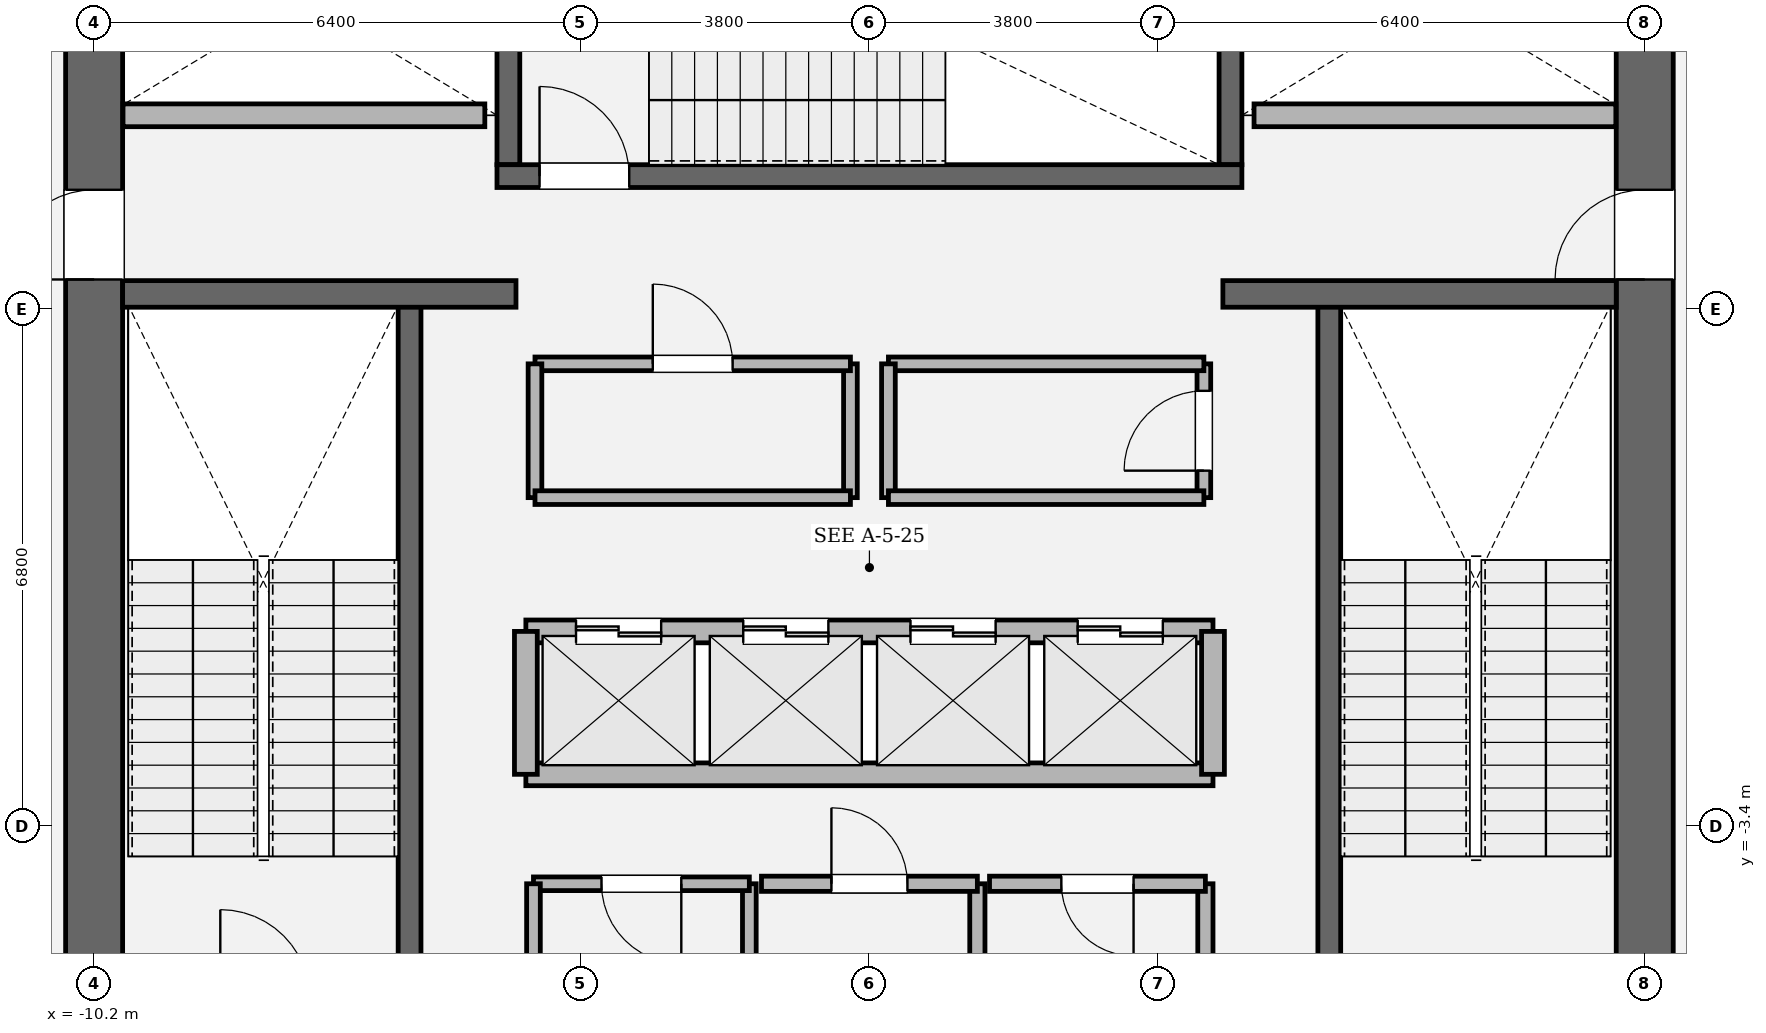
"""IFC4 building model, lengths in metres.
Left out: names, types, materials, properties, quantities, classifications, styles, units other than length and angle.
Written with IfcOpenShell. Run it as: python <this file> out.ifc"""

import sys

from ifc_helpers import new_model, si_unit, direction, frame, frame_2d, origin, place, context, subcontext, project, spatial, rectangle, extrude, element, fill, save


model = new_model("IFC4")
c1 = context("Model", 3, precision=1e-05, world=origin(), true_north=direction((0.0, 1.0)))
c2 = subcontext(c1, "Body", "Model", "MODEL_VIEW")
j1 = project(units=[si_unit("LENGTHUNIT", "METRE"), si_unit("PLANEANGLEUNIT", "RADIAN")], contexts=[c1])
p1 = place(None, origin())
s1 = spatial("IfcSite", under=j1, at=p1, CompositionType="ELEMENT")
p2 = place(p1, origin())
s2 = spatial("IfcBuilding", under=s1, at=p2, CompositionType="ELEMENT")
p3 = place(p2, frame((0.0, 0.0, 121.35)))
s3 = spatial("IfcBuildingStorey", under=s2, at=p3, CompositionType="ELEMENT", Elevation=121.35)
p4 = place(p3, frame((-10.2, -8.825, 0.0), z_axis=(0.0, 0.0, 1.0), x_axis=(0.0, 1.0, 0.0)))
e1 = element("IfcWall", 1, at=p4, inside=s3, PredefinedType="SHEAR", context=c2, shape_type="SweptSolid", body=[
    extrude(rectangle(XDim=17.65, YDim=0.75, at=frame_2d((8.825, 0.0))), origin(), (0.0, 0.0, 1.0), 4.05),
])
p5 = place(p4, frame((12.615, 0.0, 0.0)))
e2 = element("IfcOpeningElement", 2, at=p5, cuts=e1, PredefinedType="OPENING", context=c2, shape_type="SweptSolid", body=[
    extrude(rectangle(XDim=1.18, YDim=2.2, at=frame_2d((0.59, 1.1))), frame((0.0, 0.385, 0.0), z_axis=(0.0, -1.0, 0.0), x_axis=(1.0, 0.0, 0.0)), (0.0, 0.0, 1.0), 0.77),
])
p6 = place(p3, frame((10.2, 8.825, 0.0), z_axis=(0.0, 0.0, 1.0), x_axis=(0.0, -1.0, 0.0)))
e3 = element("IfcWall", 3, at=p6, inside=s3, PredefinedType="SHEAR", context=c2, shape_type="SweptSolid", body=[
    extrude(rectangle(XDim=17.65, YDim=0.75, at=frame_2d((8.825, 0.0))), origin(), (0.0, 0.0, 1.0), 4.05),
])
p7 = place(p6, frame((3.855, 0.0, 0.0)))
e4 = element("IfcOpeningElement", 4, at=p7, cuts=e3, PredefinedType="OPENING", context=c2, shape_type="SweptSolid", body=[
    extrude(rectangle(XDim=1.18, YDim=2.2, at=frame_2d((0.59, 1.1))), frame((0.0, 0.385, 0.0), z_axis=(0.0, -1.0, 0.0), x_axis=(1.0, 0.0, 0.0)), (0.0, 0.0, 1.0), 0.77),
])
for number, where, z_axis, x_axis in (
    (5, (-6.05, -5.5, 0.0), (0.0, 0.0, 1.0), (0.0, 1.0, 0.0)),
    (6, (6.05, 3.45, 0.0), (0.0, 0.0, 1.0), (0.0, -1.0, 0.0)),
):
    element("IfcWall", number, at=place(p3, frame(where, z_axis=z_axis, x_axis=x_axis)), inside=s3, PredefinedType="SOLIDWALL", context=c2, shape_type="SweptSolid", body=[
        extrude(rectangle(XDim=8.95, YDim=0.3, at=frame_2d((4.475, 0.0))), origin(), (0.0, 0.0, 1.0), 4.05),
    ])
for number, where, z_axis, x_axis in (
    (7, (-4.75, 5.3, 0.0), (0.0, 0.0, 1.0), (0.0, 1.0, 0.0)),
    (8, (4.75, 8.825, 0.0), (0.0, 0.0, 1.0), (0.0, -1.0, 0.0)),
):
    element("IfcWall", number, at=place(p3, frame(where, z_axis=z_axis, x_axis=x_axis)), inside=s3, PredefinedType="SOLIDWALL", context=c2, shape_type="SweptSolid", body=[
        extrude(rectangle(XDim=3.525, YDim=0.3, at=frame_2d((1.762, 0.0))), origin(), (0.0, 0.0, 1.0), 4.05),
    ])
p8 = place(p3, frame((-4.9, 5.15, 0.0), z_axis=(0.0, 0.0, 1.0), x_axis=(1.0, 0.0, 0.0)))
e9 = element("IfcWall", 9, at=p8, inside=s3, PredefinedType="SOLIDWALL", context=c2, shape_type="SweptSolid", body=[
    extrude(rectangle(XDim=9.8, YDim=0.3, at=frame_2d((4.9, 0.0))), origin(), (0.0, 0.0, 1.0), 4.05),
])
p9 = place(p8, frame((0.56, 0.0, 0.0)))
e10 = element("IfcOpeningElement", 10, at=p9, cuts=e9, PredefinedType="OPENING", context=c2, shape_type="SweptSolid", body=[
    extrude(rectangle(XDim=1.18, YDim=2.2, at=frame_2d((0.59, 1.1))), frame((0.0, 0.16, 0.0), z_axis=(0.0, -1.0, 0.0), x_axis=(1.0, 0.0, 0.0)), (0.0, 0.0, 1.0), 0.32),
])
for number, where, z_axis, x_axis in (
    (11, (-9.825, 3.6, 0.0), (0.0, 0.0, 1.0), (1.0, 0.0, 0.0)),
    (12, (4.65, 3.6, 0.0), (0.0, 0.0, 1.0), (1.0, 0.0, 0.0)),
):
    element("IfcWall", number, at=place(p3, frame(where, z_axis=z_axis, x_axis=x_axis)), inside=s3, PredefinedType="SOLIDWALL", context=c2, shape_type="SweptSolid", body=[
        extrude(rectangle(XDim=5.175, YDim=0.35, at=frame_2d((2.587, 0.0))), origin(), (0.0, 0.0, 1.0), 4.05),
    ])
p10 = place(p3, frame((-4.52, -0.84, 0.0), z_axis=(0.0, 0.0, 1.0), x_axis=(1.0, 0.0, 0.0)))
e13 = element("IfcWall", 13, at=p10, inside=s3, PredefinedType="SOLIDWALL", context=c2, shape_type="SweptSolid", body=[
    extrude(rectangle(XDim=9.04, YDim=0.3, at=frame_2d((4.52, 0.0))), origin(), (0.0, 0.0, 1.0), 3.73),
])
p11 = place(p10, frame((0.66, 0.0, 0.0)))
e14 = element("IfcOpeningElement", 14, at=p11, cuts=e13, PredefinedType="OPENING", context=c2, shape_type="SweptSolid", body=[
    extrude(rectangle(XDim=1.12, YDim=2.25, at=frame_2d((0.56, 1.125))), frame((0.0, 0.16, 0.0), z_axis=(0.0, -1.0, 0.0), x_axis=(1.0, 0.0, 0.0)), (0.0, 0.0, 1.0), 0.32),
])
p12 = place(p10, frame((2.86, 0.0, 0.0)))
e15 = element("IfcOpeningElement", 15, at=p12, cuts=e13, PredefinedType="OPENING", context=c2, shape_type="SweptSolid", body=[
    extrude(rectangle(XDim=1.12, YDim=2.25, at=frame_2d((0.56, 1.125))), frame((0.0, 0.16, 0.0), z_axis=(0.0, -1.0, 0.0), x_axis=(1.0, 0.0, 0.0)), (0.0, 0.0, 1.0), 0.32),
])
p13 = place(p10, frame((5.06, 0.0, 0.0)))
e16 = element("IfcOpeningElement", 16, at=p13, cuts=e13, PredefinedType="OPENING", context=c2, shape_type="SweptSolid", body=[
    extrude(rectangle(XDim=1.12, YDim=2.25, at=frame_2d((0.56, 1.125))), frame((0.0, 0.16, 0.0), z_axis=(0.0, -1.0, 0.0), x_axis=(1.0, 0.0, 0.0)), (0.0, 0.0, 1.0), 0.32),
])
p14 = place(p10, frame((7.26, 0.0, 0.0)))
e17 = element("IfcOpeningElement", 17, at=p14, cuts=e13, PredefinedType="OPENING", context=c2, shape_type="SweptSolid", body=[
    extrude(rectangle(XDim=1.12, YDim=2.25, at=frame_2d((0.56, 1.125))), frame((0.0, 0.16, 0.0), z_axis=(0.0, -1.0, 0.0), x_axis=(1.0, 0.0, 0.0)), (0.0, 0.0, 1.0), 0.32),
])
p15 = place(p3, frame((-4.52, -2.72, 0.0), z_axis=(0.0, 0.0, 1.0), x_axis=(1.0, 0.0, 0.0)))
e18 = element("IfcWall", 18, at=p15, inside=s3, PredefinedType="SOLIDWALL", context=c2, shape_type="SweptSolid", body=[
    extrude(rectangle(XDim=9.04, YDim=0.3, at=frame_2d((4.52, 0.0))), origin(), (0.0, 0.0, 1.0), 3.73),
])
for number, where, z_axis, x_axis in (
    (19, (-4.52, -2.72, 0.0), (0.0, 0.0, 1.0), (0.0, 1.0, 0.0)),
    (20, (4.52, -2.72, 0.0), (0.0, 0.0, 1.0), (0.0, 1.0, 0.0)),
):
    element("IfcWall", number, at=place(p3, frame(where, z_axis=z_axis, x_axis=x_axis)), inside=s3, PredefinedType="SOLIDWALL", context=c2, shape_type="SweptSolid", body=[
        extrude(rectangle(XDim=1.88, YDim=0.3, at=frame_2d((0.94, 0.0))), origin(), (0.0, 0.0, 1.0), 3.73),
    ])
for number, where, z_axis, x_axis in (
    (21, (-9.82, 5.95, 0.0), (0.0, 0.0, 1.0), (1.0, 0.0, 0.0)),
    (22, (5.06, 5.95, 0.0), (0.0, 0.0, 1.0), (1.0, 0.0, 0.0)),
):
    element("IfcWall", number, at=place(p3, frame(where, z_axis=z_axis, x_axis=x_axis)), inside=s3, PredefinedType="SOLIDWALL", context=c2, shape_type="SweptSolid", body=[
        extrude(rectangle(XDim=4.76, YDim=0.3, at=frame_2d((2.38, 0.0))), origin(), (0.0, 0.0, 1.0), 3.73),
    ])
p16 = place(p3, frame((-1.58, -5.9, 0.0), z_axis=(0.0, 0.0, 1.0), x_axis=(0.0, 1.0, 0.0)))
e23 = element("IfcWall", 23, at=p16, inside=s3, PredefinedType="PARTITIONING", context=c2, shape_type="SweptSolid", body=[
    extrude(rectangle(XDim=1.74, YDim=0.18, at=frame_2d((0.87, 0.0))), origin(), (0.0, 0.0, 1.0), 3.73),
])
p17 = place(p3, frame((-1.58, -4.16, 0.0), z_axis=(0.0, 0.0, 1.0), x_axis=(-1.0, 0.0, 0.0)))
e24 = element("IfcWall", 24, at=p17, inside=s3, PredefinedType="PARTITIONING", context=c2, shape_type="SweptSolid", body=[
    extrude(rectangle(XDim=2.84, YDim=0.18, at=frame_2d((1.42, 0.0))), origin(), (0.0, 0.0, 1.0), 3.73),
])
p18 = place(p17, frame((0.895, 0.0, 0.0)))
e25 = element("IfcOpeningElement", 25, at=p18, cuts=e24, PredefinedType="OPENING", context=c2, shape_type="SweptSolid", body=[
    extrude(rectangle(XDim=1.05, YDim=2.2, at=frame_2d((0.525, 1.1))), frame((0.0, 0.1, 0.0), z_axis=(0.0, -1.0, 0.0), x_axis=(1.0, 0.0, 0.0)), (0.0, 0.0, 1.0), 0.2),
])
p19 = place(p3, frame((-4.42, -4.16, 0.0), z_axis=(0.0, 0.0, 1.0), x_axis=(0.0, -1.0, 0.0)))
e26 = element("IfcWall", 26, at=p19, inside=s3, PredefinedType="PARTITIONING", context=c2, shape_type="SweptSolid", body=[
    extrude(rectangle(XDim=1.74, YDim=0.18, at=frame_2d((0.87, 0.0))), origin(), (0.0, 0.0, 1.0), 3.73),
])
p20 = place(p3, frame((1.42, -5.9, 0.0), z_axis=(0.0, 0.0, 1.0), x_axis=(0.0, 1.0, 0.0)))
e27 = element("IfcWall", 27, at=p20, inside=s3, PredefinedType="SOLIDWALL", context=c2, shape_type="SweptSolid", body=[
    extrude(rectangle(XDim=1.74, YDim=0.2, at=frame_2d((0.87, 0.0))), origin(), (0.0, 0.0, 1.0), 3.73),
])
p21 = place(p3, frame((1.42, -4.16, 0.0), z_axis=(0.0, 0.0, 1.0), x_axis=(-1.0, 0.0, 0.0)))
e28 = element("IfcWall", 28, at=p21, inside=s3, PredefinedType="SOLIDWALL", context=c2, shape_type="SweptSolid", body=[
    extrude(rectangle(XDim=2.84, YDim=0.2, at=frame_2d((1.42, 0.0))), origin(), (0.0, 0.0, 1.0), 3.73),
])
p22 = place(p21, frame((0.92, 0.0, 0.0)))
e29 = element("IfcOpeningElement", 29, at=p22, cuts=e28, PredefinedType="OPENING", context=c2, shape_type="SweptSolid", body=[
    extrude(rectangle(XDim=1.0, YDim=2.15, at=frame_2d((0.5, 1.075))), frame((0.0, 0.11, 0.0), z_axis=(0.0, -1.0, 0.0), x_axis=(1.0, 0.0, 0.0)), (0.0, 0.0, 1.0), 0.22),
])
p23 = place(p3, frame((4.42, -5.9, 0.0), z_axis=(0.0, 0.0, 1.0), x_axis=(0.0, 1.0, 0.0)))
e30 = element("IfcWall", 30, at=p23, inside=s3, PredefinedType="SOLIDWALL", context=c2, shape_type="SweptSolid", body=[
    extrude(rectangle(XDim=1.74, YDim=0.2, at=frame_2d((0.87, 0.0))), origin(), (0.0, 0.0, 1.0), 3.73),
])
p24 = place(p3, frame((4.42, -4.16, 0.0), z_axis=(0.0, 0.0, 1.0), x_axis=(-1.0, 0.0, 0.0)))
e31 = element("IfcWall", 31, at=p24, inside=s3, PredefinedType="SOLIDWALL", context=c2, shape_type="SweptSolid", body=[
    extrude(rectangle(XDim=2.84, YDim=0.2, at=frame_2d((1.42, 0.0))), origin(), (0.0, 0.0, 1.0), 3.73),
])
p25 = place(p24, frame((0.945, 0.0, 0.0)))
e32 = element("IfcOpeningElement", 32, at=p25, cuts=e31, PredefinedType="OPENING", context=c2, shape_type="SweptSolid", body=[
    extrude(rectangle(XDim=0.95, YDim=2.15, at=frame_2d((0.475, 1.075))), frame((0.0, 0.11, 0.0), z_axis=(0.0, -1.0, 0.0), x_axis=(1.0, 0.0, 0.0)), (0.0, 0.0, 1.0), 0.22),
])
p26 = place(p3, frame((-0.25, 0.92, 0.0), z_axis=(0.0, 0.0, 1.0), x_axis=(0.0, 1.0, 0.0)))
e33 = element("IfcWall", 33, at=p26, inside=s3, PredefinedType="PARTITIONING", context=c2, shape_type="SweptSolid", body=[
    extrude(rectangle(XDim=1.76, YDim=0.18, at=frame_2d((0.88, 0.0))), origin(), (0.0, 0.0, 1.0), 3.73),
])
p27 = place(p3, frame((-0.25, 2.68, 0.0), z_axis=(0.0, 0.0, 1.0), x_axis=(-1.0, 0.0, 0.0)))
e34 = element("IfcWall", 34, at=p27, inside=s3, PredefinedType="PARTITIONING", context=c2, shape_type="SweptSolid", body=[
    extrude(rectangle(XDim=4.15, YDim=0.18, at=frame_2d((2.075, 0.0))), origin(), (0.0, 0.0, 1.0), 3.73),
])
p28 = place(p27, frame((1.55, 0.0, 0.0)))
e35 = element("IfcOpeningElement", 35, at=p28, cuts=e34, PredefinedType="OPENING", context=c2, shape_type="SweptSolid", body=[
    extrude(rectangle(XDim=1.05, YDim=2.2, at=frame_2d((0.525, 1.1))), frame((0.0, 0.1, 0.0), z_axis=(0.0, -1.0, 0.0), x_axis=(1.0, 0.0, 0.0)), (0.0, 0.0, 1.0), 0.2),
])
p29 = place(p3, frame((-4.4, 2.68, 0.0), z_axis=(0.0, 0.0, 1.0), x_axis=(0.0, -1.0, 0.0)))
e36 = element("IfcWall", 36, at=p29, inside=s3, PredefinedType="PARTITIONING", context=c2, shape_type="SweptSolid", body=[
    extrude(rectangle(XDim=1.76, YDim=0.18, at=frame_2d((0.88, 0.0))), origin(), (0.0, 0.0, 1.0), 3.73),
])
p30 = place(p3, frame((-4.4, 0.92, 0.0), z_axis=(0.0, 0.0, 1.0), x_axis=(1.0, 0.0, 0.0)))
e37 = element("IfcWall", 37, at=p30, inside=s3, PredefinedType="PARTITIONING", context=c2, shape_type="SweptSolid", body=[
    extrude(rectangle(XDim=4.15, YDim=0.18, at=frame_2d((2.075, 0.0))), origin(), (0.0, 0.0, 1.0), 3.73),
])
p31 = place(p3, frame((4.4, 0.92, 0.0), z_axis=(0.0, 0.0, 1.0), x_axis=(0.0, 1.0, 0.0)))
e38 = element("IfcWall", 38, at=p31, inside=s3, PredefinedType="PARTITIONING", context=c2, shape_type="SweptSolid", body=[
    extrude(rectangle(XDim=1.76, YDim=0.18, at=frame_2d((0.88, 0.0))), origin(), (0.0, 0.0, 1.0), 3.73),
])
p32 = place(p31, frame((0.355, 0.0, 0.0)))
e39 = element("IfcOpeningElement", 39, at=p32, cuts=e38, PredefinedType="OPENING", context=c2, shape_type="SweptSolid", body=[
    extrude(rectangle(XDim=1.05, YDim=2.2, at=frame_2d((0.525, 1.1))), frame((0.0, 0.1, 0.0), z_axis=(0.0, -1.0, 0.0), x_axis=(1.0, 0.0, 0.0)), (0.0, 0.0, 1.0), 0.2),
])
p33 = place(p3, frame((4.4, 2.68, 0.0), z_axis=(0.0, 0.0, 1.0), x_axis=(-1.0, 0.0, 0.0)))
e40 = element("IfcWall", 40, at=p33, inside=s3, PredefinedType="PARTITIONING", context=c2, shape_type="SweptSolid", body=[
    extrude(rectangle(XDim=4.15, YDim=0.18, at=frame_2d((2.075, 0.0))), origin(), (0.0, 0.0, 1.0), 3.73),
])
p34 = place(p3, frame((0.25, 2.68, 0.0), z_axis=(0.0, 0.0, 1.0), x_axis=(0.0, -1.0, 0.0)))
e41 = element("IfcWall", 41, at=p34, inside=s3, PredefinedType="PARTITIONING", context=c2, shape_type="SweptSolid", body=[
    extrude(rectangle(XDim=1.76, YDim=0.18, at=frame_2d((0.88, 0.0))), origin(), (0.0, 0.0, 1.0), 3.73),
])
p35 = place(p3, frame((0.25, 0.92, 0.0), z_axis=(0.0, 0.0, 1.0), x_axis=(1.0, 0.0, 0.0)))
e42 = element("IfcWall", 42, at=p35, inside=s3, PredefinedType="PARTITIONING", context=c2, shape_type="SweptSolid", body=[
    extrude(rectangle(XDim=4.15, YDim=0.18, at=frame_2d((2.075, 0.0))), origin(), (0.0, 0.0, 1.0), 3.73),
])
p36 = place(p9, origin())
e43 = element("IfcDoor", 43, at=p36, inside=s3, OperationType="SINGLE_SWING_LEFT", PredefinedType="DOOR", context=c2, shape_type="SweptSolid", body=[
    extrude(rectangle(XDim=1.18, YDim=2.2, at=frame_2d((0.59, 1.1))), frame((0.0, 0.025, 0.0), z_axis=(0.0, -1.0, 0.0), x_axis=(1.0, 0.0, 0.0)), (0.0, 0.0, 1.0), 0.05),
])
fill(e10, e43)
p37 = place(p5, origin())
e44 = element("IfcDoor", 44, at=p37, inside=s3, OperationType="SINGLE_SWING_LEFT", PredefinedType="DOOR", context=c2, shape_type="SweptSolid", body=[
    extrude(rectangle(XDim=1.18, YDim=2.2, at=frame_2d((0.59, 1.1))), frame((0.0, 0.025, 0.0), z_axis=(0.0, -1.0, 0.0), x_axis=(1.0, 0.0, 0.0)), (0.0, 0.0, 1.0), 0.05),
])
fill(e2, e44)
p38 = place(p7, origin())
e45 = element("IfcDoor", 45, at=p38, inside=s3, OperationType="SINGLE_SWING_RIGHT", PredefinedType="DOOR", context=c2, shape_type="SweptSolid", body=[
    extrude(rectangle(XDim=1.18, YDim=2.2, at=frame_2d((0.59, 1.1))), frame((0.0, 0.025, 0.0), z_axis=(0.0, -1.0, 0.0), x_axis=(1.0, 0.0, 0.0)), (0.0, 0.0, 1.0), 0.05),
])
fill(e4, e45)
p39 = place(p11, origin())
e46 = element("IfcDoor", 46, at=p39, inside=s3, OperationType="DOUBLE_DOOR_SLIDING", PredefinedType="DOOR", context=c2, shape_type="SweptSolid", body=[
    extrude(rectangle(XDim=1.12, YDim=2.25, at=frame_2d((0.56, 1.125))), frame((0.0, 0.025, 0.0), z_axis=(0.0, -1.0, 0.0), x_axis=(1.0, 0.0, 0.0)), (0.0, 0.0, 1.0), 0.05),
])
fill(e14, e46)
p40 = place(p12, origin())
e47 = element("IfcDoor", 47, at=p40, inside=s3, OperationType="DOUBLE_DOOR_SLIDING", PredefinedType="DOOR", context=c2, shape_type="SweptSolid", body=[
    extrude(rectangle(XDim=1.12, YDim=2.25, at=frame_2d((0.56, 1.125))), frame((0.0, 0.025, 0.0), z_axis=(0.0, -1.0, 0.0), x_axis=(1.0, 0.0, 0.0)), (0.0, 0.0, 1.0), 0.05),
])
fill(e15, e47)
p41 = place(p13, origin())
e48 = element("IfcDoor", 48, at=p41, inside=s3, OperationType="DOUBLE_DOOR_SLIDING", PredefinedType="DOOR", context=c2, shape_type="SweptSolid", body=[
    extrude(rectangle(XDim=1.12, YDim=2.25, at=frame_2d((0.56, 1.125))), frame((0.0, 0.025, 0.0), z_axis=(0.0, -1.0, 0.0), x_axis=(1.0, 0.0, 0.0)), (0.0, 0.0, 1.0), 0.05),
])
fill(e16, e48)
p42 = place(p14, origin())
e49 = element("IfcDoor", 49, at=p42, inside=s3, OperationType="DOUBLE_DOOR_SLIDING", PredefinedType="DOOR", context=c2, shape_type="SweptSolid", body=[
    extrude(rectangle(XDim=1.12, YDim=2.25, at=frame_2d((0.56, 1.125))), frame((0.0, 0.025, 0.0), z_axis=(0.0, -1.0, 0.0), x_axis=(1.0, 0.0, 0.0)), (0.0, 0.0, 1.0), 0.05),
])
fill(e17, e49)
p43 = place(p18, origin())
e50 = element("IfcDoor", 50, at=p43, inside=s3, OperationType="SINGLE_SWING_LEFT", PredefinedType="DOOR", context=c2, shape_type="SweptSolid", body=[
    extrude(rectangle(XDim=1.05, YDim=2.2, at=frame_2d((0.525, 1.1))), frame((0.0, 0.025, 0.0), z_axis=(0.0, -1.0, 0.0), x_axis=(1.0, 0.0, 0.0)), (0.0, 0.0, 1.0), 0.05),
])
fill(e25, e50)
p44 = place(p22, origin())
e51 = element("IfcDoor", 51, at=p44, inside=s3, OperationType="SINGLE_SWING_RIGHT", PredefinedType="DOOR", context=c2, shape_type="SweptSolid", body=[
    extrude(rectangle(XDim=1.0, YDim=2.15, at=frame_2d((0.5, 1.075))), frame((0.0, 0.025, 0.0), z_axis=(0.0, -1.0, 0.0), x_axis=(1.0, 0.0, 0.0)), (0.0, 0.0, 1.0), 0.05),
])
fill(e29, e51)
p45 = place(p25, origin())
e52 = element("IfcDoor", 52, at=p45, inside=s3, OperationType="SINGLE_SWING_LEFT", PredefinedType="DOOR", context=c2, shape_type="SweptSolid", body=[
    extrude(rectangle(XDim=0.95, YDim=2.15, at=frame_2d((0.475, 1.075))), frame((0.0, 0.025, 0.0), z_axis=(0.0, -1.0, 0.0), x_axis=(1.0, 0.0, 0.0)), (0.0, 0.0, 1.0), 0.05),
])
fill(e32, e52)
p46 = place(p28, origin())
e53 = element("IfcDoor", 53, at=p46, inside=s3, OperationType="SINGLE_SWING_RIGHT", PredefinedType="DOOR", context=c2, shape_type="SweptSolid", body=[
    extrude(rectangle(XDim=1.05, YDim=2.2, at=frame_2d((0.525, 1.1))), frame((0.0, 0.025, 0.0), z_axis=(0.0, -1.0, 0.0), x_axis=(1.0, 0.0, 0.0)), (0.0, 0.0, 1.0), 0.05),
])
fill(e35, e53)
p47 = place(p32, origin())
e54 = element("IfcDoor", 54, at=p47, inside=s3, OperationType="SINGLE_SWING_LEFT", PredefinedType="DOOR", context=c2, shape_type="SweptSolid", body=[
    extrude(rectangle(XDim=1.05, YDim=2.2, at=frame_2d((0.525, 1.1))), frame((0.0, 0.025, 0.0), z_axis=(0.0, -1.0, 0.0), x_axis=(1.0, 0.0, 0.0)), (0.0, 0.0, 1.0), 0.05),
])
fill(e39, e54)
save(model, sys.argv[1])
